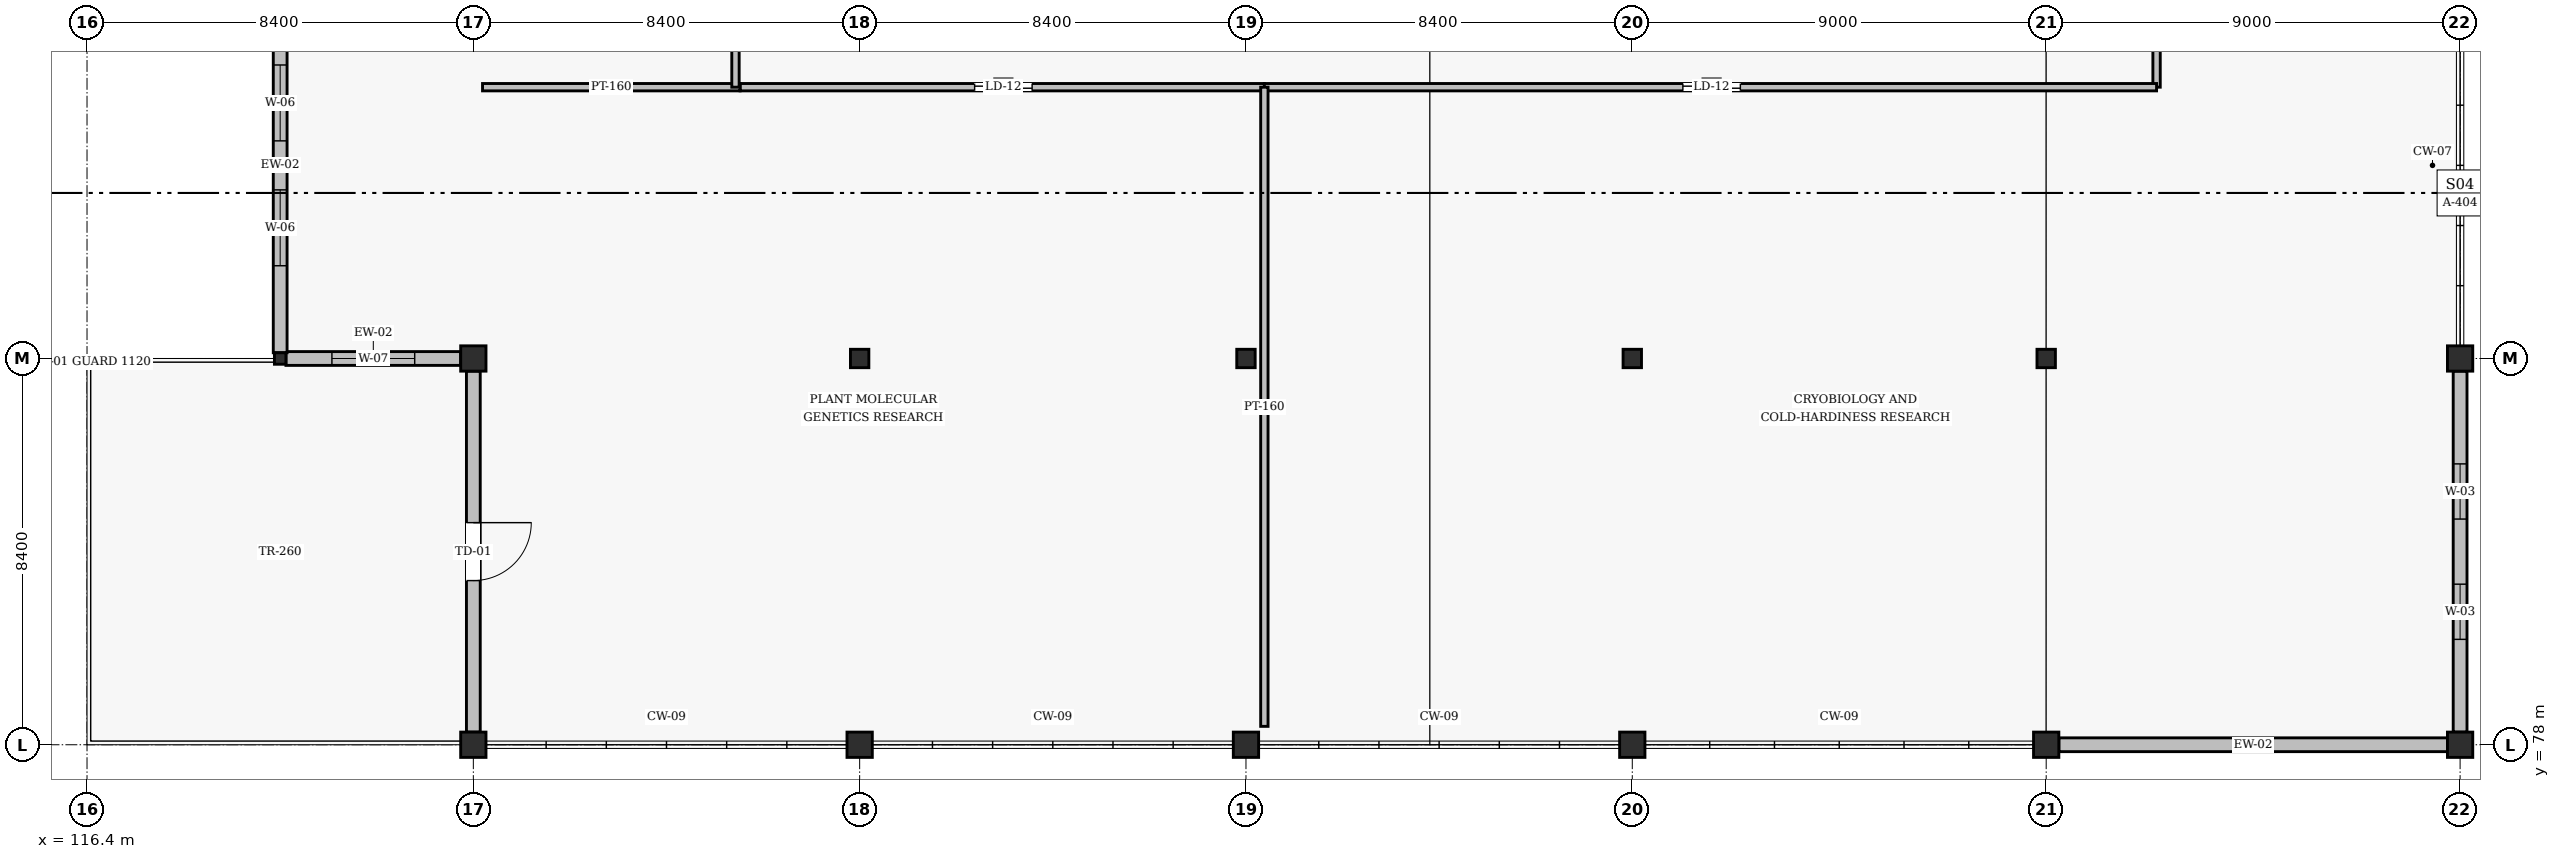
"""IFC4 building model, lengths in metres.
Left out: names, types, materials, properties, quantities, classifications, styles, units other than length and angle.
Written with IfcOpenShell. Run it as: python <this file> out.ifc"""

import sys

from ifc_helpers import new_model, si_unit, direction, frame, frame_2d, origin, origin_2d, place, context, subcontext, project, spatial, rectangle, hollow_rectangle, i_section, extrude, element, fill, save


model = new_model("IFC4")
c1 = context("Model", 3, precision=1e-05, world=origin(), true_north=direction((0.0, 1.0)))
c2 = subcontext(c1, "Body", "Model", "MODEL_VIEW")
j1 = project(units=[si_unit("LENGTHUNIT", "METRE"), si_unit("PLANEANGLEUNIT", "RADIAN")], contexts=[c1])
p1 = place(None, origin())
s1 = spatial("IfcSite", under=j1, at=p1, CompositionType="ELEMENT")
p2 = place(p1, origin())
s2 = spatial("IfcBuilding", under=s1, at=p2, CompositionType="ELEMENT")
p3 = place(p2, frame((0.0, 0.0, 21.0)))
s3 = spatial("IfcBuildingStorey", under=s2, at=p3, CompositionType="ELEMENT", Elevation=21.0)
p4 = place(p3, frame((120.6, 86.4, -0.3), z_axis=(0.0, 0.0, 1.0), x_axis=(1.0, 0.0, 0.0)))
e1 = element("IfcColumn", 1, at=p4, inside=s3, PredefinedType="COLUMN", context=c2, shape_type="SweptSolid", body=[
    extrude(i_section(OverallWidth=0.25, OverallDepth=0.25, WebThickness=0.009, FlangeThickness=0.014, FilletRadius=0.016, at=origin_2d()), origin(), (0.0, 0.0, 1.0), 3.9),
])
for number, where, z_axis, x_axis in (
    (2, (124.8, 78.0, 0.0), (0.0, 0.0, 1.0), (1.0, 0.0, 0.0)),
    (3, (124.8, 86.4, 0.0), (0.0, 0.0, 1.0), (1.0, 0.0, 0.0)),
    (4, (133.2, 78.0, 0.0), (0.0, 0.0, 1.0), (1.0, 0.0, 0.0)),
):
    element("IfcColumn", number, at=place(p3, frame(where, z_axis=z_axis, x_axis=x_axis)), inside=s3, PredefinedType="COLUMN", context=c2, shape_type="SweptSolid", body=[
        extrude(hollow_rectangle(XDim=0.55, YDim=0.55, WallThickness=0.022, InnerFilletRadius=0.022, OuterFilletRadius=0.044, at=origin_2d()), origin(), (0.0, 0.0, 1.0), 3.6),
    ])
p5 = place(p3, frame((133.2, 86.4, 0.0), z_axis=(0.0, 0.0, 1.0), x_axis=(1.0, 0.0, 0.0)))
e5 = element("IfcColumn", 5, at=p5, inside=s3, PredefinedType="COLUMN", context=c2, shape_type="SweptSolid", body=[
    extrude(i_section(OverallWidth=0.4, OverallDepth=0.4, WebThickness=0.013, FlangeThickness=0.021, FilletRadius=0.022, at=origin_2d()), origin(), (0.0, 0.0, 1.0), 3.6),
])
p6 = place(p3, frame((141.6, 78.0, 0.0), z_axis=(0.0, 0.0, 1.0), x_axis=(1.0, 0.0, 0.0)))
e6 = element("IfcColumn", 6, at=p6, inside=s3, PredefinedType="COLUMN", context=c2, shape_type="SweptSolid", body=[
    extrude(hollow_rectangle(XDim=0.55, YDim=0.55, WallThickness=0.022, InnerFilletRadius=0.022, OuterFilletRadius=0.044, at=origin_2d()), origin(), (0.0, 0.0, 1.0), 3.6),
])
p7 = place(p3, frame((141.6, 86.4, 0.0), z_axis=(0.0, 0.0, 1.0), x_axis=(1.0, 0.0, 0.0)))
e7 = element("IfcColumn", 7, at=p7, inside=s3, PredefinedType="COLUMN", context=c2, shape_type="SweptSolid", body=[
    extrude(i_section(OverallWidth=0.4, OverallDepth=0.4, WebThickness=0.013, FlangeThickness=0.021, FilletRadius=0.022, at=origin_2d()), origin(), (0.0, 0.0, 1.0), 3.6),
])
p8 = place(p3, frame((150.0, 78.0, 0.0), z_axis=(0.0, 0.0, 1.0), x_axis=(1.0, 0.0, 0.0)))
e8 = element("IfcColumn", 8, at=p8, inside=s3, PredefinedType="COLUMN", context=c2, shape_type="SweptSolid", body=[
    extrude(hollow_rectangle(XDim=0.55, YDim=0.55, WallThickness=0.022, InnerFilletRadius=0.022, OuterFilletRadius=0.044, at=origin_2d()), origin(), (0.0, 0.0, 1.0), 3.6),
])
p9 = place(p3, frame((150.0, 86.4, 0.0), z_axis=(0.0, 0.0, 1.0), x_axis=(1.0, 0.0, 0.0)))
e9 = element("IfcColumn", 9, at=p9, inside=s3, PredefinedType="COLUMN", context=c2, shape_type="SweptSolid", body=[
    extrude(i_section(OverallWidth=0.4, OverallDepth=0.4, WebThickness=0.013, FlangeThickness=0.021, FilletRadius=0.022, at=origin_2d()), origin(), (0.0, 0.0, 1.0), 3.6),
])
p10 = place(p3, frame((159.0, 78.0, 0.0), z_axis=(0.0, 0.0, 1.0), x_axis=(1.0, 0.0, 0.0)))
e10 = element("IfcColumn", 10, at=p10, inside=s3, PredefinedType="COLUMN", context=c2, shape_type="SweptSolid", body=[
    extrude(hollow_rectangle(XDim=0.55, YDim=0.55, WallThickness=0.022, InnerFilletRadius=0.022, OuterFilletRadius=0.044, at=origin_2d()), origin(), (0.0, 0.0, 1.0), 3.6),
])
p11 = place(p3, frame((159.0, 86.4, 0.0), z_axis=(0.0, 0.0, 1.0), x_axis=(1.0, 0.0, 0.0)))
e11 = element("IfcColumn", 11, at=p11, inside=s3, PredefinedType="COLUMN", context=c2, shape_type="SweptSolid", body=[
    extrude(i_section(OverallWidth=0.4, OverallDepth=0.4, WebThickness=0.013, FlangeThickness=0.021, FilletRadius=0.022, at=origin_2d()), origin(), (0.0, 0.0, 1.0), 3.6),
])
for number, where, z_axis, x_axis in (
    (12, (168.0, 78.0, 0.0), (0.0, 0.0, 1.0), (1.0, 0.0, 0.0)),
    (13, (168.0, 86.4, 0.0), (0.0, 0.0, 1.0), (1.0, 0.0, 0.0)),
):
    element("IfcColumn", number, at=place(p3, frame(where, z_axis=z_axis, x_axis=x_axis)), inside=s3, PredefinedType="COLUMN", context=c2, shape_type="SweptSolid", body=[
        extrude(hollow_rectangle(XDim=0.55, YDim=0.55, WallThickness=0.022, InnerFilletRadius=0.022, OuterFilletRadius=0.044, at=origin_2d()), origin(), (0.0, 0.0, 1.0), 3.6),
    ])
p12 = place(p3, frame((120.725, 86.4, 0.0), z_axis=(0.0, 0.0, 1.0), x_axis=(1.0, 0.0, 0.0)))
e14 = element("IfcWall", 14, at=p12, inside=s3, PredefinedType="SOLIDWALL", context=c2, shape_type="SweptSolid", body=[
    extrude(rectangle(XDim=3.8, YDim=0.3, at=frame_2d((1.9, 0.0))), origin(), (0.0, 0.0, 1.0), 2.856),
])
p13 = place(p12, frame((1.0, 0.0, 0.85)))
e15 = element("IfcOpeningElement", 15, at=p13, cuts=e14, PredefinedType="OPENING", context=c2, shape_type="SweptSolid", body=[
    extrude(rectangle(XDim=1.8, YDim=1.71, at=frame_2d((0.9, 0.855))), frame((0.0, 0.16, 0.0), z_axis=(0.0, -1.0, 0.0), x_axis=(1.0, 0.0, 0.0)), (0.0, 0.0, 1.0), 0.32),
])
p14 = place(p3, frame((124.8, 86.125, 0.0), z_axis=(0.0, 0.0, 1.0), x_axis=(0.0, -1.0, 0.0)))
e16 = element("IfcWall", 16, at=p14, inside=s3, PredefinedType="SOLIDWALL", context=c2, shape_type="SweptSolid", body=[
    extrude(rectangle(XDim=7.85, YDim=0.3, at=frame_2d((3.925, 0.0))), origin(), (0.0, 0.0, 1.0), 2.85),
])
p15 = place(p14, frame((3.295, 0.0, 0.0)))
e17 = element("IfcOpeningElement", 17, at=p15, cuts=e16, PredefinedType="OPENING", context=c2, shape_type="SweptSolid", body=[
    extrude(rectangle(XDim=1.26, YDim=2.24, at=frame_2d((0.63, 1.12))), frame((0.0, 0.16, 0.0), z_axis=(0.0, -1.0, 0.0), x_axis=(1.0, 0.0, 0.0)), (0.0, 0.0, 1.0), 0.32),
])
p16 = place(p3, frame((159.275, 78.0, 0.0), z_axis=(0.0, 0.0, 1.0), x_axis=(1.0, 0.0, 0.0)))
e18 = element("IfcWall", 18, at=p16, inside=s3, PredefinedType="SOLIDWALL", context=c2, shape_type="SweptSolid", body=[
    extrude(rectangle(XDim=8.45, YDim=0.3, at=frame_2d((4.225, 0.0))), origin(), (0.0, 0.0, 1.0), 2.558),
])
p17 = place(p3, frame((168.0, 78.275, 0.0), z_axis=(0.0, 0.0, 1.0), x_axis=(0.0, 1.0, 0.0)))
e19 = element("IfcWall", 19, at=p17, inside=s3, PredefinedType="SOLIDWALL", context=c2, shape_type="SweptSolid", body=[
    extrude(rectangle(XDim=7.85, YDim=0.3, at=frame_2d((3.925, 0.0))), origin(), (0.0, 0.0, 1.0), 2.85),
])
p18 = place(p17, frame((2.017, 0.0, 0.85)))
e20 = element("IfcOpeningElement", 20, at=p18, cuts=e19, PredefinedType="OPENING", context=c2, shape_type="SweptSolid", body=[
    extrude(rectangle(XDim=1.2, YDim=1.7, at=frame_2d((0.6, 0.85))), frame((0.0, 0.16, 0.0), z_axis=(0.0, -1.0, 0.0), x_axis=(1.0, 0.0, 0.0)), (0.0, 0.0, 1.0), 0.32),
])
p19 = place(p17, frame((4.633, 0.0, 0.85)))
e21 = element("IfcOpeningElement", 21, at=p19, cuts=e19, PredefinedType="OPENING", context=c2, shape_type="SweptSolid", body=[
    extrude(rectangle(XDim=1.2, YDim=1.7, at=frame_2d((0.6, 0.85))), frame((0.0, 0.16, 0.0), z_axis=(0.0, -1.0, 0.0), x_axis=(1.0, 0.0, 0.0)), (0.0, 0.0, 1.0), 0.32),
])
p20 = place(p3, frame((120.6, 94.675, 0.0), z_axis=(0.0, 0.0, 1.0), x_axis=(0.0, -1.0, 0.0)))
e22 = element("IfcWall", 22, at=p20, inside=s3, PredefinedType="SOLIDWALL", context=c2, shape_type="SweptSolid", body=[
    extrude(rectangle(XDim=8.15, YDim=0.3, at=frame_2d((4.075, 0.0))), origin(), (0.0, 0.0, 1.0), 2.85),
])
p21 = place(p20, frame((1.892, 0.0, 0.85)))
e23 = element("IfcOpeningElement", 23, at=p21, cuts=e22, PredefinedType="OPENING", context=c2, shape_type="SweptSolid", body=[
    extrude(rectangle(XDim=1.65, YDim=1.7, at=frame_2d((0.825, 0.85))), frame((0.0, 0.16, 0.0), z_axis=(0.0, -1.0, 0.0), x_axis=(1.0, 0.0, 0.0)), (0.0, 0.0, 1.0), 0.32),
])
p22 = place(p20, frame((4.608, 0.0, 0.85)))
e24 = element("IfcOpeningElement", 24, at=p22, cuts=e22, PredefinedType="OPENING", context=c2, shape_type="SweptSolid", body=[
    extrude(rectangle(XDim=1.65, YDim=1.7, at=frame_2d((0.825, 0.85))), frame((0.0, 0.16, 0.0), z_axis=(0.0, -1.0, 0.0), x_axis=(1.0, 0.0, 0.0)), (0.0, 0.0, 1.0), 0.32),
])
p23 = place(p3, frame((161.4, 92.3, 0.0), z_axis=(0.0, 0.0, 1.0), x_axis=(0.0, 1.0, 0.0)))
e25 = element("IfcWall", 25, at=p23, inside=s3, PredefinedType="PARTITIONING", context=c2, shape_type="SweptSolid", body=[
    extrude(rectangle(XDim=14.1, YDim=0.16, at=frame_2d((7.05, 0.0))), origin(), (0.0, 0.0, 1.0), 2.75),
])
p24 = place(p23, frame((6.5, 0.0, 0.0)))
e26 = element("IfcOpeningElement", 26, at=p24, cuts=e25, PredefinedType="OPENING", context=c2, shape_type="SweptSolid", body=[
    extrude(rectangle(XDim=1.08, YDim=2.08, at=frame_2d((0.54, 1.04))), frame((0.0, 0.09, 0.0), z_axis=(0.0, -1.0, 0.0), x_axis=(1.0, 0.0, 0.0)), (0.0, 0.0, 1.0), 0.18),
])
p25 = place(p3, frame((130.6, 92.3, 0.0), z_axis=(0.0, 0.0, 1.0), x_axis=(1.0, 0.0, 0.0)))
e27 = element("IfcWall", 27, at=p25, inside=s3, PredefinedType="PARTITIONING", context=c2, shape_type="SweptSolid", body=[
    extrude(rectangle(XDim=11.4, YDim=0.16, at=frame_2d((5.7, 0.0))), origin(), (0.0, 0.0, 1.0), 2.85),
])
p26 = place(p25, frame((5.1, 0.0, 0.0)))
e28 = element("IfcOpeningElement", 28, at=p26, cuts=e27, PredefinedType="OPENING", context=c2, shape_type="SweptSolid", body=[
    extrude(rectangle(XDim=1.25, YDim=2.12, at=frame_2d((0.625, 1.06))), frame((0.0, 0.09, 0.0), z_axis=(0.0, -1.0, 0.0), x_axis=(1.0, 0.0, 0.0)), (0.0, 0.0, 1.0), 0.18),
])
p27 = place(p3, frame((142.0, 92.3, 0.0), z_axis=(0.0, 0.0, 1.0), x_axis=(1.0, 0.0, 0.0)))
e29 = element("IfcWall", 29, at=p27, inside=s3, PredefinedType="PARTITIONING", context=c2, shape_type="SweptSolid", body=[
    extrude(rectangle(XDim=19.4, YDim=0.16, at=frame_2d((9.7, 0.0))), origin(), (0.0, 0.0, 1.0), 2.85),
])
p28 = place(p27, frame((9.1, 0.0, 0.0)))
e30 = element("IfcOpeningElement", 30, at=p28, cuts=e29, PredefinedType="OPENING", context=c2, shape_type="SweptSolid", body=[
    extrude(rectangle(XDim=1.25, YDim=2.12, at=frame_2d((0.625, 1.06))), frame((0.0, 0.09, 0.0), z_axis=(0.0, -1.0, 0.0), x_axis=(1.0, 0.0, 0.0)), (0.0, 0.0, 1.0), 0.18),
])
p29 = place(p3, frame((125.0, 92.3, 0.0), z_axis=(0.0, 0.0, 1.0), x_axis=(1.0, 0.0, 0.0)))
e31 = element("IfcWall", 31, at=p29, inside=s3, PredefinedType="PARTITIONING", context=c2, shape_type="SweptSolid", body=[
    extrude(rectangle(XDim=5.6, YDim=0.16, at=frame_2d((2.8, 0.0))), origin(), (0.0, 0.0, 1.0), 3.35),
])
p30 = place(p3, frame((142.0, 78.4, 0.0), z_axis=(0.0, 0.0, 1.0), x_axis=(0.0, 1.0, 0.0)))
e32 = element("IfcWall", 32, at=p30, inside=s3, PredefinedType="PARTITIONING", context=c2, shape_type="SweptSolid", body=[
    extrude(rectangle(XDim=13.9, YDim=0.16, at=frame_2d((6.95, 0.0))), origin(), (0.0, 0.0, 1.0), 2.854),
])
p31 = place(p3, frame((130.5, 92.3, 0.0), z_axis=(0.0, 0.0, 1.0), x_axis=(0.0, 1.0, 0.0)))
e33 = element("IfcWall", 33, at=p31, inside=s3, PredefinedType="PARTITIONING", context=c2, shape_type="SweptSolid", body=[
    extrude(rectangle(XDim=10.9, YDim=0.16, at=frame_2d((5.45, 0.0))), origin(), (0.0, 0.0, 1.0), 2.854),
])
p32 = place(p31, frame((4.9, 0.0, 0.0)))
e34 = element("IfcOpeningElement", 34, at=p32, cuts=e33, PredefinedType="OPENING", context=c2, shape_type="SweptSolid", body=[
    extrude(rectangle(XDim=1.14, YDim=2.12, at=frame_2d((0.57, 1.06))), frame((0.0, 0.09, 0.0), z_axis=(0.0, -1.0, 0.0), x_axis=(1.0, 0.0, 0.0)), (0.0, 0.0, 1.0), 0.18),
])
p33 = place(p13, origin())
e35 = element("IfcWindow", 35, at=p33, inside=s3, PartitioningType="SINGLE_PANEL", PredefinedType="WINDOW", context=c2, shape_type="SweptSolid", body=[
    extrude(rectangle(XDim=1.8, YDim=1.71, at=frame_2d((0.9, 0.855))), frame((0.0, 0.03, 0.0), z_axis=(0.0, -1.0, 0.0), x_axis=(1.0, 0.0, 0.0)), (0.0, 0.0, 1.0), 0.06),
])
fill(e15, e35)
p34 = place(p15, frame((1.26, 0.0, 0.0), z_axis=(0.0, 0.0, 1.0), x_axis=(-1.0, 0.0, 0.0)))
e36 = element("IfcDoor", 36, at=p34, inside=s3, OperationType="SINGLE_SWING_LEFT", PredefinedType="DOOR", context=c2, shape_type="SweptSolid", body=[
    extrude(rectangle(XDim=1.26, YDim=2.24, at=frame_2d((0.63, 1.12))), frame((0.0, 0.025, 0.0), z_axis=(0.0, -1.0, 0.0), x_axis=(1.0, 0.0, 0.0)), (0.0, 0.0, 1.0), 0.05),
])
fill(e17, e36)
p35 = place(p18, origin())
e37 = element("IfcWindow", 37, at=p35, inside=s3, PartitioningType="SINGLE_PANEL", PredefinedType="WINDOW", context=c2, shape_type="SweptSolid", body=[
    extrude(rectangle(XDim=1.2, YDim=1.7, at=frame_2d((0.6, 0.85))), frame((0.0, 0.03, 0.0), z_axis=(0.0, -1.0, 0.0), x_axis=(1.0, 0.0, 0.0)), (0.0, 0.0, 1.0), 0.06),
])
fill(e20, e37)
p36 = place(p19, origin())
e38 = element("IfcWindow", 38, at=p36, inside=s3, PartitioningType="SINGLE_PANEL", PredefinedType="WINDOW", context=c2, shape_type="SweptSolid", body=[
    extrude(rectangle(XDim=1.2, YDim=1.7, at=frame_2d((0.6, 0.85))), frame((0.0, 0.03, 0.0), z_axis=(0.0, -1.0, 0.0), x_axis=(1.0, 0.0, 0.0)), (0.0, 0.0, 1.0), 0.06),
])
fill(e21, e38)
p37 = place(p21, origin())
e39 = element("IfcWindow", 39, at=p37, inside=s3, PartitioningType="SINGLE_PANEL", PredefinedType="WINDOW", context=c2, shape_type="SweptSolid", body=[
    extrude(rectangle(XDim=1.65, YDim=1.7, at=frame_2d((0.825, 0.85))), frame((0.0, 0.03, 0.0), z_axis=(0.0, -1.0, 0.0), x_axis=(1.0, 0.0, 0.0)), (0.0, 0.0, 1.0), 0.06),
])
fill(e23, e39)
p38 = place(p22, origin())
e40 = element("IfcWindow", 40, at=p38, inside=s3, PartitioningType="SINGLE_PANEL", PredefinedType="WINDOW", context=c2, shape_type="SweptSolid", body=[
    extrude(rectangle(XDim=1.65, YDim=1.7, at=frame_2d((0.825, 0.85))), frame((0.0, 0.03, 0.0), z_axis=(0.0, -1.0, 0.0), x_axis=(1.0, 0.0, 0.0)), (0.0, 0.0, 1.0), 0.06),
])
fill(e24, e40)
p39 = place(p26, origin())
e41 = element("IfcDoor", 41, at=p39, inside=s3, OperationType="SINGLE_SWING_LEFT", PredefinedType="DOOR", context=c2, shape_type="SweptSolid", body=[
    extrude(rectangle(XDim=1.25, YDim=2.12, at=frame_2d((0.625, 1.06))), frame((0.0, 0.025, 0.0), z_axis=(0.0, -1.0, 0.0), x_axis=(1.0, 0.0, 0.0)), (0.0, 0.0, 1.0), 0.05),
])
fill(e28, e41)
p40 = place(p28, origin())
e42 = element("IfcDoor", 42, at=p40, inside=s3, OperationType="SINGLE_SWING_LEFT", PredefinedType="DOOR", context=c2, shape_type="SweptSolid", body=[
    extrude(rectangle(XDim=1.25, YDim=2.12, at=frame_2d((0.625, 1.06))), frame((0.0, 0.025, 0.0), z_axis=(0.0, -1.0, 0.0), x_axis=(1.0, 0.0, 0.0)), (0.0, 0.0, 1.0), 0.05),
])
fill(e30, e42)
save(model, sys.argv[1])
